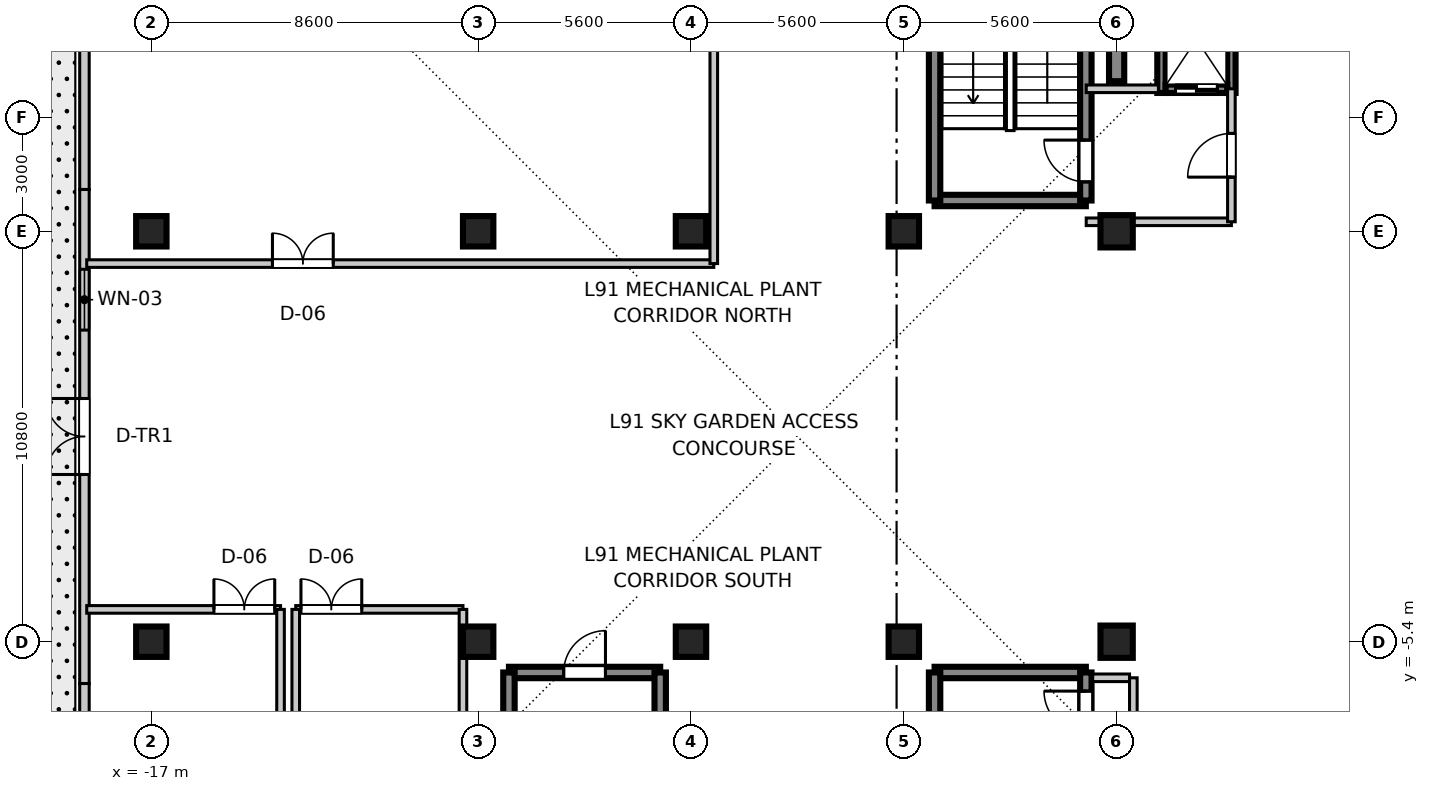
"""IFC4 building model, lengths in metres.
Left out: names, types, materials, properties, quantities, classifications, styles, units other than length and angle.
Written with IfcOpenShell. Run it as: python <this file> out.ifc"""

import sys

from ifc_helpers import new_model, si_unit, direction, frame, frame_2d, origin, origin_2d, place, context, subcontext, project, spatial, rectangle, extrude, source, transform, mapped, element, fill, save


model = new_model("IFC4")
c1 = context("Model", 3, precision=1e-05, world=origin(), true_north=direction((0.0, 1.0)))
c2 = subcontext(c1, "Body", "Model", "MODEL_VIEW")
j1 = project(units=[si_unit("LENGTHUNIT", "METRE"), si_unit("PLANEANGLEUNIT", "RADIAN")], contexts=[c1])
p1 = place(None, origin())
s1 = spatial("IfcSite", under=j1, at=p1, CompositionType="ELEMENT")
p2 = place(p1, origin())
s2 = spatial("IfcBuilding", under=s1, at=p2, CompositionType="ELEMENT")
p3 = place(p2, frame((0.0, 0.0, 357.05)))
s3 = spatial("IfcBuildingStorey", under=s2, at=p3, CompositionType="ELEMENT", Elevation=357.05)
m1 = source(origin(), c2, "Body", "SweptSolid", [
    extrude(rectangle(XDim=0.8, YDim=0.8, at=origin_2d()), origin(), (0.0, 0.0, 1.0), 4.555),
])
for number, where, z_axis, x_axis in (
    (1, (-17.0, -5.4, 0.0), (0.0, 0.0, 1.0), (1.0, 0.0, 0.0)),
    (2, (-17.0, 5.4, 0.0), (0.0, 0.0, 1.0), (1.0, 0.0, 0.0)),
    (3, (-8.4, -5.4, 0.0), (0.0, 0.0, 1.0), (1.0, 0.0, 0.0)),
    (4, (-8.4, 5.4, 0.0), (0.0, 0.0, 1.0), (1.0, 0.0, 0.0)),
    (5, (-2.8, -5.4, 0.0), (0.0, 0.0, 1.0), (1.0, 0.0, 0.0)),
    (6, (-2.8, 5.4, 0.0), (0.0, 0.0, 1.0), (1.0, 0.0, 0.0)),
    (7, (2.8, -5.4, 0.0), (0.0, 0.0, 1.0), (1.0, 0.0, 0.0)),
    (8, (2.8, 5.4, 0.0), (0.0, 0.0, 1.0), (1.0, 0.0, 0.0)),
):
    element("IfcColumn", number, at=place(p3, frame(where, z_axis=z_axis, x_axis=x_axis)), inside=s3, PredefinedType="COLUMN", context=c2, shape_type="MappedRepresentation", body=[
        mapped(m1, transform((0.0, 0.0, 0.0), scale=1.0)),
    ])
m2 = source(origin(), c2, "Body", "SweptSolid", [
    extrude(rectangle(XDim=0.85, YDim=0.85, at=origin_2d()), origin(), (0.0, 0.0, 1.0), 4.555),
])
for number, where, z_axis, x_axis in (
    (9, (8.4, -5.4, 0.0), (0.0, 0.0, 1.0), (1.0, 0.0, 0.0)),
    (10, (8.4, 5.4, 0.0), (0.0, 0.0, 1.0), (1.0, 0.0, 0.0)),
):
    element("IfcColumn", number, at=place(p3, frame(where, z_axis=z_axis, x_axis=x_axis)), inside=s3, PredefinedType="PILASTER", context=c2, shape_type="MappedRepresentation", body=[
        mapped(m2, transform((0.0, 0.0, 0.0), scale=1.0)),
    ])
m3 = source(origin(), c2, "Body", "SweptSolid", [
    extrude(rectangle(XDim=7.65, YDim=0.4, at=frame_2d((3.825, 0.0))), origin(), (0.0, 0.0, 1.0), 4.3),
])
p4 = place(p3, frame((8.4, 9.35, 0.0), z_axis=(0.0, 0.0, 1.0), x_axis=(0.0, 1.0, 0.0)))
e11 = element("IfcWall", 11, at=p4, inside=s3, PredefinedType="SHEAR", context=c2, shape_type="MappedRepresentation", body=[
    mapped(m3, transform((0.0, 0.0, 0.0), scale=1.0)),
])
m4 = source(origin(), c2, "Body", "SweptSolid", [
    extrude(rectangle(XDim=3.98, YDim=0.3, at=frame_2d((1.99, 0.0))), origin(), (0.0, 0.0, 1.0), 4.3),
])
p5 = place(p3, frame((3.61, 6.21, 0.0), z_axis=(0.0, 0.0, 1.0), x_axis=(1.0, 0.0, 0.0)))
e12 = element("IfcWall", 12, at=p5, inside=s3, PredefinedType="SHEAR", context=c2, shape_type="MappedRepresentation", body=[
    mapped(m4, transform((0.0, 0.0, 0.0), scale=1.0)),
])
m5 = source(origin(), c2, "Body", "SweptSolid", [
    extrude(rectangle(XDim=9.38, YDim=0.3, at=frame_2d((4.69, 0.0))), origin(), (0.0, 0.0, 1.0), 4.3),
])
p6 = place(p3, frame((3.61, 6.21, 0.0), z_axis=(0.0, 0.0, 1.0), x_axis=(0.0, 1.0, 0.0)))
e13 = element("IfcWall", 13, at=p6, inside=s3, PredefinedType="SHEAR", context=c2, shape_type="MappedRepresentation", body=[
    mapped(m5, transform((0.0, 0.0, 0.0), scale=1.0)),
])
p7 = place(p3, frame((7.59, 6.21, 0.0), z_axis=(0.0, 0.0, 1.0), x_axis=(0.0, 1.0, 0.0)))
e14 = element("IfcWall", 14, at=p7, inside=s3, PredefinedType="SHEAR", context=c2, shape_type="MappedRepresentation", body=[
    mapped(m5, transform((0.0, 0.0, 0.0), scale=1.0)),
])
p8 = place(p7, frame((0.49, 0.0, 0.0)))
e15 = element("IfcOpeningElement", 15, at=p8, cuts=e14, PredefinedType="OPENING", context=c2, shape_type="SweptSolid", body=[
    extrude(rectangle(XDim=1.1, YDim=2.15, at=frame_2d((0.55, 1.075))), frame((0.0, 0.16, 0.0), z_axis=(0.0, -1.0, 0.0), x_axis=(1.0, 0.0, 0.0)), (0.0, 0.0, 1.0), 0.32),
])
p9 = place(p3, frame((3.61, -6.21, 0.0), z_axis=(0.0, 0.0, 1.0), x_axis=(1.0, 0.0, 0.0)))
e16 = element("IfcWall", 16, at=p9, inside=s3, PredefinedType="SHEAR", context=c2, shape_type="MappedRepresentation", body=[
    mapped(m4, transform((0.0, 0.0, 0.0), scale=1.0)),
])
p10 = place(p3, frame((3.61, -15.59, 0.0), z_axis=(0.0, 0.0, 1.0), x_axis=(0.0, 1.0, 0.0)))
e17 = element("IfcWall", 17, at=p10, inside=s3, PredefinedType="SHEAR", context=c2, shape_type="MappedRepresentation", body=[
    mapped(m5, transform((0.0, 0.0, 0.0), scale=1.0)),
])
p11 = place(p3, frame((7.59, -15.59, 0.0), z_axis=(0.0, 0.0, 1.0), x_axis=(0.0, 1.0, 0.0)))
e18 = element("IfcWall", 18, at=p11, inside=s3, PredefinedType="SHEAR", context=c2, shape_type="MappedRepresentation", body=[
    mapped(m5, transform((0.0, 0.0, 0.0), scale=1.0)),
])
p12 = place(p11, frame((7.79, 0.0, 0.0)))
e19 = element("IfcOpeningElement", 19, at=p12, cuts=e18, PredefinedType="OPENING", context=c2, shape_type="SweptSolid", body=[
    extrude(rectangle(XDim=1.1, YDim=2.15, at=frame_2d((0.55, 1.075))), frame((0.0, 0.16, 0.0), z_axis=(0.0, -1.0, 0.0), x_axis=(1.0, 0.0, 0.0)), (0.0, 0.0, 1.0), 0.32),
])
p13 = place(p3, frame((-7.59, -6.21, 0.0), z_axis=(0.0, 0.0, 1.0), x_axis=(1.0, 0.0, 0.0)))
e20 = element("IfcWall", 20, at=p13, inside=s3, PredefinedType="SHEAR", context=c2, shape_type="MappedRepresentation", body=[
    mapped(m4, transform((0.0, 0.0, 0.0), scale=1.0)),
])
p14 = place(p13, frame((1.44, 0.0, 0.0)))
e21 = element("IfcOpeningElement", 21, at=p14, cuts=e20, PredefinedType="OPENING", context=c2, shape_type="SweptSolid", body=[
    extrude(rectangle(XDim=1.1, YDim=2.15, at=frame_2d((0.55, 1.075))), frame((0.0, 0.16, 0.0), z_axis=(0.0, -1.0, 0.0), x_axis=(1.0, 0.0, 0.0)), (0.0, 0.0, 1.0), 0.32),
])
for number, where, z_axis, x_axis in (
    (22, (-7.59, -15.59, 0.0), (0.0, 0.0, 1.0), (0.0, 1.0, 0.0)),
    (23, (-3.61, -15.59, 0.0), (0.0, 0.0, 1.0), (0.0, 1.0, 0.0)),
):
    element("IfcWall", number, at=place(p3, frame(where, z_axis=z_axis, x_axis=x_axis)), inside=s3, PredefinedType="SHEAR", context=c2, shape_type="MappedRepresentation", body=[
        mapped(m5, transform((0.0, 0.0, 0.0), scale=1.0)),
    ])
m6 = source(origin(), c2, "Body", "SweptSolid", [
    extrude(rectangle(XDim=2.82, YDim=0.22, at=frame_2d((1.41, 0.0))), origin(), (0.0, 0.0, 1.0), 4.3),
])
for number, where, z_axis, x_axis in (
    (24, (9.58, 9.04, 0.0), (0.0, 0.0, 1.0), (0.0, 1.0, 0.0)),
    (25, (11.42, 9.04, 0.0), (0.0, 0.0, 1.0), (0.0, 1.0, 0.0)),
):
    element("IfcWall", number, at=place(p3, frame(where, z_axis=z_axis, x_axis=x_axis)), inside=s3, PredefinedType="SHEAR", context=c2, shape_type="MappedRepresentation", body=[
        mapped(m6, transform((0.0, 0.0, 0.0), scale=1.0)),
    ])
m7 = source(origin(), c2, "Body", "SweptSolid", [
    extrude(rectangle(XDim=1.62, YDim=0.22, at=frame_2d((0.81, 0.0))), origin(), (0.0, 0.0, 1.0), 4.3),
])
p15 = place(p3, frame((9.69, 9.15, 0.0), z_axis=(0.0, 0.0, 1.0), x_axis=(1.0, 0.0, 0.0)))
e26 = element("IfcWall", 26, at=p15, inside=s3, PredefinedType="SHEAR", context=c2, shape_type="MappedRepresentation", body=[
    mapped(m7, transform((0.0, 0.0, 0.0), scale=1.0)),
])
p16 = place(p15, frame((0.26, 0.0, 0.0)))
e27 = element("IfcOpeningElement", 27, at=p16, cuts=e26, PredefinedType="OPENING", context=c2, shape_type="SweptSolid", body=[
    extrude(rectangle(XDim=1.1, YDim=2.2, at=frame_2d((0.55, 1.1))), frame((0.0, 0.12, 0.0), z_axis=(0.0, -1.0, 0.0), x_axis=(1.0, 0.0, 0.0)), (0.0, 0.0, 1.0), 0.24),
])
m8 = source(origin(), c2, "Body", "SweptSolid", [
    extrude(rectangle(XDim=9.46, YDim=0.25, at=frame_2d((4.73, 0.0))), origin(), (0.0, 0.0, 1.0), 3.78),
])
for number, where, z_axis, x_axis in (
    (28, (-18.76, -15.96, 0.0), (0.0, 0.0, 1.0), (0.0, 1.0, 0.0)),
    (29, (-18.76, 6.5, 0.0), (0.0, 0.0, 1.0), (0.0, 1.0, 0.0)),
):
    element("IfcWall", number, at=place(p3, frame(where, z_axis=z_axis, x_axis=x_axis)), inside=s3, PredefinedType="STANDARD", context=c2, shape_type="MappedRepresentation", body=[
        mapped(m8, transform((0.0, 0.0, 0.0), scale=1.0)),
    ])
m9 = source(origin(), c2, "Body", "SweptSolid", [
    extrude(rectangle(XDim=13.0, YDim=0.25, at=frame_2d((6.5, 0.0))), origin(), (0.0, 0.0, 1.0), 3.78),
])
p17 = place(p3, frame((-18.76, -6.5, 0.0), z_axis=(0.0, 0.0, 1.0), x_axis=(0.0, 1.0, 0.0)))
e30 = element("IfcWall", 30, at=p17, inside=s3, PredefinedType="STANDARD", context=c2, shape_type="MappedRepresentation", body=[
    mapped(m9, transform((0.0, 0.0, 0.0), scale=1.0)),
])
p18 = place(p17, frame((5.5, 0.0, 0.0)))
e31 = element("IfcOpeningElement", 31, at=p18, cuts=e30, PredefinedType="OPENING", context=c2, shape_type="SweptSolid", body=[
    extrude(rectangle(XDim=2.0, YDim=2.35, at=frame_2d((1.0, 1.175))), frame((0.0, 0.135, 0.0), z_axis=(0.0, -1.0, 0.0), x_axis=(1.0, 0.0, 0.0)), (0.0, 0.0, 1.0), 0.27),
])
p19 = place(p17, frame((9.3, 0.0, 0.9)))
e32 = element("IfcOpeningElement", 32, at=p19, cuts=e30, PredefinedType="OPENING", context=c2, shape_type="SweptSolid", body=[
    extrude(rectangle(XDim=1.6, YDim=1.8, at=frame_2d((0.8, 0.9))), frame((0.0, 0.135, 0.0), z_axis=(0.0, -1.0, 0.0), x_axis=(1.0, 0.0, 0.0)), (0.0, 0.0, 1.0), 0.27),
])
m10 = source(origin(), c2, "Body", "SweptSolid", [
    extrude(rectangle(XDim=3.82, YDim=0.2, at=frame_2d((1.91, 0.0))), origin(), (0.0, 0.0, 1.0), 3.4),
])
p20 = place(p3, frame((7.6, 5.65, 0.0), z_axis=(0.0, 0.0, 1.0), x_axis=(1.0, 0.0, 0.0)))
e33 = element("IfcWall", 33, at=p20, inside=s3, PredefinedType="PARTITIONING", context=c2, shape_type="MappedRepresentation", body=[
    mapped(m10, transform((0.0, 0.0, 0.0), scale=1.0)),
])
m11 = source(origin(), c2, "Body", "SweptSolid", [
    extrude(rectangle(XDim=1.9, YDim=0.2, at=frame_2d((0.95, 0.0))), origin(), (0.0, 0.0, 1.0), 3.4),
])
p21 = place(p3, frame((7.6, 9.15, 0.0), z_axis=(0.0, 0.0, 1.0), x_axis=(1.0, 0.0, 0.0)))
e34 = element("IfcWall", 34, at=p21, inside=s3, PredefinedType="PARTITIONING", context=c2, shape_type="MappedRepresentation", body=[
    mapped(m11, transform((0.0, 0.0, 0.0), scale=1.0)),
])
m12 = source(origin(), c2, "Body", "SweptSolid", [
    extrude(rectangle(XDim=3.5, YDim=0.2, at=frame_2d((1.75, 0.0))), origin(), (0.0, 0.0, 1.0), 3.4),
])
p22 = place(p3, frame((11.42, 5.65, 0.0), z_axis=(0.0, 0.0, 1.0), x_axis=(0.0, 1.0, 0.0)))
e35 = element("IfcWall", 35, at=p22, inside=s3, PredefinedType="PARTITIONING", context=c2, shape_type="MappedRepresentation", body=[
    mapped(m12, transform((0.0, 0.0, 0.0), scale=1.0)),
])
p23 = place(p22, frame((1.175, 0.0, 0.0)))
e36 = element("IfcOpeningElement", 36, at=p23, cuts=e35, PredefinedType="OPENING", context=c2, shape_type="SweptSolid", body=[
    extrude(rectangle(XDim=1.15, YDim=2.15, at=frame_2d((0.575, 1.075))), frame((0.0, 0.11, 0.0), z_axis=(0.0, -1.0, 0.0), x_axis=(1.0, 0.0, 0.0)), (0.0, 0.0, 1.0), 0.22),
])
m13 = source(origin(), c2, "Body", "SweptSolid", [
    extrude(rectangle(XDim=0.97, YDim=0.2, at=frame_2d((0.485, 0.0))), origin(), (0.0, 0.0, 1.0), 3.4),
])
p24 = place(p3, frame((7.77, -6.35, 0.0), z_axis=(0.0, 0.0, 1.0), x_axis=(1.0, 0.0, 0.0)))
e37 = element("IfcWall", 37, at=p24, inside=s3, PredefinedType="PARTITIONING", context=c2, shape_type="MappedRepresentation", body=[
    mapped(m13, transform((0.0, 0.0, 0.0), scale=1.0)),
])
m14 = source(origin(), c2, "Body", "SweptSolid", [
    extrude(rectangle(XDim=8.23, YDim=0.2, at=frame_2d((4.115, 0.0))), origin(), (0.0, 0.0, 1.0), 3.4),
])
p25 = place(p3, frame((8.84, -14.58, 0.0), z_axis=(0.0, 0.0, 1.0), x_axis=(0.0, 1.0, 0.0)))
e38 = element("IfcWall", 38, at=p25, inside=s3, PredefinedType="PARTITIONING", context=c2, shape_type="MappedRepresentation", body=[
    mapped(m14, transform((0.0, 0.0, 0.0), scale=1.0)),
])
m15 = source(origin(), c2, "Body", "SweptSolid", [
    extrude(rectangle(XDim=16.5, YDim=0.2, at=frame_2d((8.25, 0.0))), origin(), (0.0, 0.0, 1.0), 3.4),
])
p26 = place(p3, frame((-18.7, 4.55, 0.0), z_axis=(0.0, 0.0, 1.0), x_axis=(1.0, 0.0, 0.0)))
e39 = element("IfcWall", 39, at=p26, inside=s3, PredefinedType="PARTITIONING", context=c2, shape_type="MappedRepresentation", body=[
    mapped(m15, transform((0.0, 0.0, 0.0), scale=1.0)),
])
p27 = place(p26, frame((4.887, 0.0, 0.0)))
e40 = element("IfcOpeningElement", 40, at=p27, cuts=e39, PredefinedType="OPENING", context=c2, shape_type="SweptSolid", body=[
    extrude(rectangle(XDim=1.6, YDim=2.15, at=frame_2d((0.8, 1.075))), frame((0.0, 0.11, 0.0), z_axis=(0.0, -1.0, 0.0), x_axis=(1.0, 0.0, 0.0)), (0.0, 0.0, 1.0), 0.22),
])
m16 = source(origin(), c2, "Body", "SweptSolid", [
    extrude(rectangle(XDim=14.15, YDim=0.2, at=frame_2d((7.075, 0.0))), origin(), (0.0, 0.0, 1.0), 3.4),
])
p28 = place(p3, frame((-2.2, 4.55, 0.0), z_axis=(0.0, 0.0, 1.0), x_axis=(0.0, 1.0, 0.0)))
e41 = element("IfcWall", 41, at=p28, inside=s3, PredefinedType="PARTITIONING", context=c2, shape_type="MappedRepresentation", body=[
    mapped(m16, transform((0.0, 0.0, 0.0), scale=1.0)),
])
m17 = source(origin(), c2, "Body", "SweptSolid", [
    extrude(rectangle(XDim=5.1, YDim=0.2, at=frame_2d((2.55, 0.0))), origin(), (0.0, 0.0, 1.0), 3.4),
])
p29 = place(p3, frame((-18.7, -4.55, 0.0), z_axis=(0.0, 0.0, 1.0), x_axis=(1.0, 0.0, 0.0)))
e42 = element("IfcWall", 42, at=p29, inside=s3, PredefinedType="PARTITIONING", context=c2, shape_type="MappedRepresentation", body=[
    mapped(m17, transform((0.0, 0.0, 0.0), scale=1.0)),
])
p30 = place(p29, frame((3.347, 0.0, 0.0)))
e43 = element("IfcOpeningElement", 43, at=p30, cuts=e42, PredefinedType="OPENING", context=c2, shape_type="SweptSolid", body=[
    extrude(rectangle(XDim=1.6, YDim=2.15, at=frame_2d((0.8, 1.075))), frame((0.0, 0.11, 0.0), z_axis=(0.0, -1.0, 0.0), x_axis=(1.0, 0.0, 0.0)), (0.0, 0.0, 1.0), 0.22),
])
p31 = place(p3, frame((-13.6, -18.7, 0.0), z_axis=(0.0, 0.0, 1.0), x_axis=(0.0, 1.0, 0.0)))
e44 = element("IfcWall", 44, at=p31, inside=s3, PredefinedType="PARTITIONING", context=c2, shape_type="MappedRepresentation", body=[
    mapped(m16, transform((0.0, 0.0, 0.0), scale=1.0)),
])
m18 = source(origin(), c2, "Body", "SweptSolid", [
    extrude(rectangle(XDim=4.4, YDim=0.2, at=frame_2d((2.2, 0.0))), origin(), (0.0, 0.0, 1.0), 3.4),
])
p32 = place(p3, frame((-13.2, -4.55, 0.0), z_axis=(0.0, 0.0, 1.0), x_axis=(1.0, 0.0, 0.0)))
e45 = element("IfcWall", 45, at=p32, inside=s3, PredefinedType="PARTITIONING", context=c2, shape_type="MappedRepresentation", body=[
    mapped(m18, transform((0.0, 0.0, 0.0), scale=1.0)),
])
p33 = place(p32, frame((0.137, 0.0, 0.0)))
e46 = element("IfcOpeningElement", 46, at=p33, cuts=e45, PredefinedType="OPENING", context=c2, shape_type="SweptSolid", body=[
    extrude(rectangle(XDim=1.6, YDim=2.15, at=frame_2d((0.8, 1.075))), frame((0.0, 0.11, 0.0), z_axis=(0.0, -1.0, 0.0), x_axis=(1.0, 0.0, 0.0)), (0.0, 0.0, 1.0), 0.22),
])
for number, where, z_axis, x_axis in (
    (47, (-13.2, -18.7, 0.0), (0.0, 0.0, 1.0), (0.0, 1.0, 0.0)),
    (48, (-8.8, -18.7, 0.0), (0.0, 0.0, 1.0), (0.0, 1.0, 0.0)),
):
    element("IfcWall", number, at=place(p3, frame(where, z_axis=z_axis, x_axis=x_axis)), inside=s3, PredefinedType="PARTITIONING", context=c2, shape_type="MappedRepresentation", body=[
        mapped(m16, transform((0.0, 0.0, 0.0), scale=1.0)),
    ])
m19 = source(origin(), c2, "Body", "SweptSolid", [
    extrude(rectangle(XDim=1.1, YDim=2.15, at=frame_2d((0.55, 1.075))), frame((0.0, 0.025, 0.0), z_axis=(0.0, -1.0, 0.0), x_axis=(1.0, 0.0, 0.0)), (0.0, 0.0, 1.0), 0.05),
])
p34 = place(p8, origin())
e49 = element("IfcDoor", 49, at=p34, inside=s3, OperationType="SINGLE_SWING_RIGHT", PredefinedType="DOOR", context=c2, shape_type="MappedRepresentation", body=[
    mapped(m19, transform((0.0, 0.0, 0.0), scale=1.0)),
])
fill(e15, e49)
p35 = place(p12, origin())
e50 = element("IfcDoor", 50, at=p35, inside=s3, OperationType="SINGLE_SWING_RIGHT", PredefinedType="DOOR", context=c2, shape_type="MappedRepresentation", body=[
    mapped(m19, transform((0.0, 0.0, 0.0), scale=1.0)),
])
fill(e19, e50)
p36 = place(p14, frame((1.1, 0.0, 0.0), z_axis=(0.0, 0.0, 1.0), x_axis=(-1.0, 0.0, 0.0)))
e51 = element("IfcDoor", 51, at=p36, inside=s3, OperationType="SINGLE_SWING_RIGHT", PredefinedType="DOOR", context=c2, shape_type="MappedRepresentation", body=[
    mapped(m19, transform((0.0, 0.0, 0.0), scale=1.0)),
])
fill(e21, e51)
m20 = source(origin(), c2, "Body", "SweptSolid", [
    extrude(rectangle(XDim=1.1, YDim=2.2, at=frame_2d((0.55, 1.1))), frame((0.0, 0.025, 0.0), z_axis=(0.0, -1.0, 0.0), x_axis=(1.0, 0.0, 0.0)), (0.0, 0.0, 1.0), 0.05),
])
p37 = place(p16, frame((1.1, 0.0, 0.0), z_axis=(0.0, 0.0, 1.0), x_axis=(-1.0, 0.0, 0.0)))
e52 = element("IfcDoor", 52, at=p37, inside=s3, OperationType="DOUBLE_DOOR_SLIDING", PredefinedType="DOOR", context=c2, shape_type="MappedRepresentation", body=[
    mapped(m20, transform((0.0, 0.0, 0.0), scale=1.0)),
])
fill(e27, e52)
m21 = source(origin(), c2, "Body", "SweptSolid", [
    extrude(rectangle(XDim=2.0, YDim=2.35, at=frame_2d((1.0, 1.175))), frame((0.0, 0.025, 0.0), z_axis=(0.0, -1.0, 0.0), x_axis=(1.0, 0.0, 0.0)), (0.0, 0.0, 1.0), 0.05),
])
p38 = place(p18, origin())
e53 = element("IfcDoor", 53, at=p38, inside=s3, OperationType="DOUBLE_DOOR_SINGLE_SWING", PredefinedType="DOOR", context=c2, shape_type="MappedRepresentation", body=[
    mapped(m21, transform((0.0, 0.0, 0.0), scale=1.0)),
])
fill(e31, e53)
m22 = source(origin(), c2, "Body", "SweptSolid", [
    extrude(rectangle(XDim=1.6, YDim=1.8, at=frame_2d((0.8, 0.9))), frame((0.0, 0.03, 0.0), z_axis=(0.0, -1.0, 0.0), x_axis=(1.0, 0.0, 0.0)), (0.0, 0.0, 1.0), 0.06),
])
p39 = place(p19, origin())
e54 = element("IfcWindow", 54, at=p39, inside=s3, PartitioningType="SINGLE_PANEL", PredefinedType="WINDOW", context=c2, shape_type="MappedRepresentation", body=[
    mapped(m22, transform((0.0, 0.0, 0.0), scale=1.0)),
])
fill(e32, e54)
m23 = source(origin(), c2, "Body", "SweptSolid", [
    extrude(rectangle(XDim=1.15, YDim=2.15, at=frame_2d((0.575, 1.075))), frame((0.0, 0.025, 0.0), z_axis=(0.0, -1.0, 0.0), x_axis=(1.0, 0.0, 0.0)), (0.0, 0.0, 1.0), 0.05),
])
p40 = place(p23, frame((1.15, 0.0, 0.0), z_axis=(0.0, 0.0, 1.0), x_axis=(-1.0, 0.0, 0.0)))
e55 = element("IfcDoor", 55, at=p40, inside=s3, OperationType="SINGLE_SWING_LEFT", PredefinedType="DOOR", context=c2, shape_type="MappedRepresentation", body=[
    mapped(m23, transform((0.0, 0.0, 0.0), scale=1.0)),
])
fill(e36, e55)
m24 = source(origin(), c2, "Body", "SweptSolid", [
    extrude(rectangle(XDim=1.6, YDim=2.15, at=frame_2d((0.8, 1.075))), frame((0.0, 0.025, 0.0), z_axis=(0.0, -1.0, 0.0), x_axis=(1.0, 0.0, 0.0)), (0.0, 0.0, 1.0), 0.05),
])
p41 = place(p27, origin())
e56 = element("IfcDoor", 56, at=p41, inside=s3, OperationType="DOUBLE_DOOR_SINGLE_SWING", PredefinedType="DOOR", context=c2, shape_type="MappedRepresentation", body=[
    mapped(m24, transform((0.0, 0.0, 0.0), scale=1.0)),
])
fill(e40, e56)
p42 = place(p30, frame((1.6, 0.0, 0.0), z_axis=(0.0, 0.0, 1.0), x_axis=(-1.0, 0.0, 0.0)))
e57 = element("IfcDoor", 57, at=p42, inside=s3, OperationType="DOUBLE_DOOR_SINGLE_SWING", PredefinedType="DOOR", context=c2, shape_type="MappedRepresentation", body=[
    mapped(m24, transform((0.0, 0.0, 0.0), scale=1.0)),
])
fill(e43, e57)
p43 = place(p33, frame((1.6, 0.0, 0.0), z_axis=(0.0, 0.0, 1.0), x_axis=(-1.0, 0.0, 0.0)))
e58 = element("IfcDoor", 58, at=p43, inside=s3, OperationType="DOUBLE_DOOR_SINGLE_SWING", PredefinedType="DOOR", context=c2, shape_type="MappedRepresentation", body=[
    mapped(m24, transform((0.0, 0.0, 0.0), scale=1.0)),
])
fill(e46, e58)
save(model, sys.argv[1])
